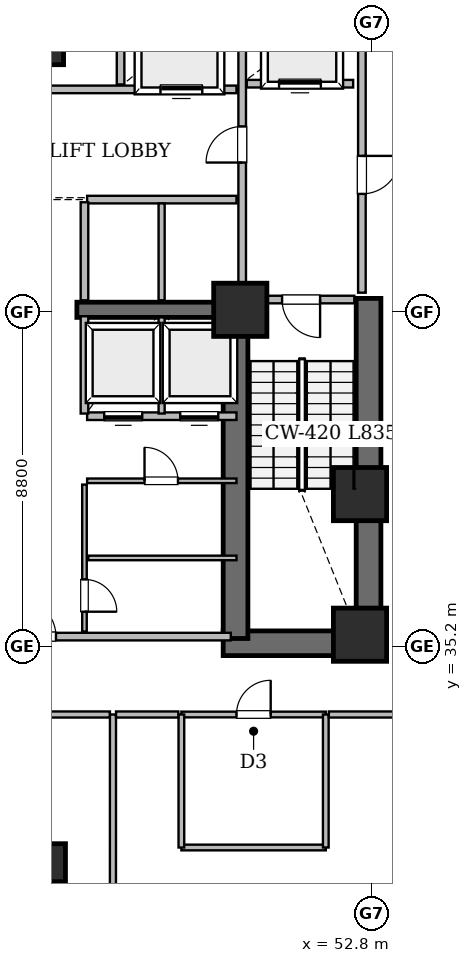
"""IFC4 building model, lengths in metres.
Left out: names, types, materials, properties, quantities, classifications, styles, units other than length and angle.
Written with IfcOpenShell. Run it as: python <this file> out.ifc"""

import sys

from ifc_helpers import new_model, si_unit, direction, frame, frame_2d, origin, origin_2d, place, context, subcontext, project, spatial, rectangle, extrude, element, fill, save


model = new_model("IFC4")
c1 = context("Model", 3, precision=1e-05, world=origin(), true_north=direction((0.0, 1.0)))
c2 = subcontext(c1, "Body", "Model", "MODEL_VIEW")
j1 = project(units=[si_unit("LENGTHUNIT", "METRE"), si_unit("PLANEANGLEUNIT", "RADIAN")], contexts=[c1])
p1 = place(None, origin())
s1 = spatial("IfcSite", under=j1, at=p1, CompositionType="ELEMENT")
p2 = place(p1, origin())
s2 = spatial("IfcBuilding", under=s1, at=p2, CompositionType="ELEMENT")
p3 = place(p2, frame((0.0, 0.0, 14.4)))
s3 = spatial("IfcBuildingStorey", under=s2, at=p3, CompositionType="ELEMENT", Elevation=14.4)
p4 = place(p3, frame((48.9, 35.275, 0.0), z_axis=(0.0, 0.0, 1.0), x_axis=(1.0, 0.0, 0.0)))
e1 = element("IfcWall", 1, at=p4, inside=s3, PredefinedType="SHEAR", context=c2, shape_type="SweptSolid", body=[
    extrude(rectangle(XDim=4.15, YDim=0.65, at=frame_2d((2.075, 0.0))), origin(), (0.0, 0.0, 1.0), 4.5),
])
p5 = place(p3, frame((52.725, 34.95, 0.0), z_axis=(0.0, 0.0, 1.0), x_axis=(0.0, 1.0, 0.0)))
e2 = element("IfcWall", 2, at=p5, inside=s3, PredefinedType="SHEAR", context=c2, shape_type="SweptSolid", body=[
    extrude(rectangle(XDim=9.4, YDim=0.65, at=frame_2d((4.7, 0.0))), origin(), (0.0, 0.0, 1.0), 4.5),
])
p6 = place(p3, frame((49.225, 35.4, 0.0), z_axis=(0.0, 0.0, 1.0), x_axis=(0.0, 1.0, 0.0)))
e3 = element("IfcWall", 3, at=p6, inside=s3, PredefinedType="SHEAR", context=c2, shape_type="SweptSolid", body=[
    extrude(rectangle(XDim=8.95, YDim=0.65, at=frame_2d((4.475, 0.0))), origin(), (0.0, 0.0, 1.0), 4.5),
])
p7 = place(p3, frame((45.05, 44.05, 0.0), z_axis=(0.0, 0.0, 1.0), x_axis=(1.0, 0.0, 0.0)))
e4 = element("IfcWall", 4, at=p7, inside=s3, PredefinedType="SHEAR", context=c2, shape_type="SweptSolid", body=[
    extrude(rectangle(XDim=4.2, YDim=0.4, at=frame_2d((2.1, 0.0))), origin(), (0.0, 0.0, 1.0), 4.5),
])
for number, where, z_axis, x_axis in (
    (5, (52.5, 35.5, 0.0), (0.0, 0.0, 1.0), (1.0, 0.0, 0.0)),
    (6, (52.5, 39.2, 0.0), (0.0, 0.0, 1.0), (1.0, 0.0, 0.0)),
    (7, (49.35, 44.05, 0.0), (0.0, 0.0, 1.0), (1.0, 0.0, 0.0)),
    (8, (44.0, 51.2, 0.0), (0.0, 0.0, 1.0), (1.0, 0.0, 0.0)),
):
    element("IfcColumn", number, at=place(p3, frame(where, z_axis=z_axis, x_axis=x_axis)), inside=s3, PredefinedType="COLUMN", context=c2, shape_type="SweptSolid", body=[
        extrude(rectangle(XDim=1.4, YDim=1.4, at=origin_2d()), origin(), (0.0, 0.0, 1.0), 4.8),
    ])
p8 = place(p3, frame((44.0, 29.5, 0.0), z_axis=(0.0, 0.0, 1.0), x_axis=(1.0, 0.0, 0.0)))
e9 = element("IfcColumn", 9, at=p8, inside=s3, PredefinedType="COLUMN", context=c2, shape_type="SweptSolid", body=[
    extrude(rectangle(XDim=1.5, YDim=1.0, at=origin_2d()), origin(), (0.0, 0.0, 1.0), 4.8),
])
p9 = place(p3, frame((38.9, 35.45, 0.0), z_axis=(0.0, 0.0, 1.0), x_axis=(1.0, 0.0, 0.0)))
e10 = element("IfcWall", 10, at=p9, inside=s3, PredefinedType="SOLIDWALL", context=c2, shape_type="SweptSolid", body=[
    extrude(rectangle(XDim=10.2, YDim=0.2, at=frame_2d((5.1, 0.0))), origin(), (0.0, 0.0, 1.0), 4.5),
])
p10 = place(p9, frame((4.6, 0.0, 0.0)))
e11 = element("IfcOpeningElement", 11, at=p10, cuts=e10, PredefinedType="OPENING", context=c2, shape_type="SweptSolid", body=[
    extrude(rectangle(XDim=1.0, YDim=2.15, at=frame_2d((0.5, 1.075))), frame((0.0, 0.11, 0.0), z_axis=(0.0, -1.0, 0.0), x_axis=(1.0, 0.0, 0.0)), (0.0, 0.0, 1.0), 0.22),
])
p11 = place(p3, frame((52.55, 44.5, 0.0), z_axis=(0.0, 0.0, 1.0), x_axis=(0.0, 1.0, 0.0)))
e12 = element("IfcWall", 12, at=p11, inside=s3, PredefinedType="SOLIDWALL", context=c2, shape_type="SweptSolid", body=[
    extrude(rectangle(XDim=7.92, YDim=0.2, at=frame_2d((3.96, 0.0))), origin(), (0.0, 0.0, 1.0), 4.5),
])
p12 = place(p11, frame((2.6, 0.0, 0.0)))
e13 = element("IfcOpeningElement", 13, at=p12, cuts=e12, PredefinedType="OPENING", context=c2, shape_type="SweptSolid", body=[
    extrude(rectangle(XDim=1.0, YDim=2.15, at=frame_2d((0.5, 1.075))), frame((0.0, 0.11, 0.0), z_axis=(0.0, -1.0, 0.0), x_axis=(1.0, 0.0, 0.0)), (0.0, 0.0, 1.0), 0.22),
])
p13 = place(p3, frame((49.4, 44.5, 0.0), z_axis=(0.0, 0.0, 1.0), x_axis=(0.0, 1.0, 0.0)))
e14 = element("IfcWall", 14, at=p13, inside=s3, PredefinedType="SOLIDWALL", context=c2, shape_type="SweptSolid", body=[
    extrude(rectangle(XDim=7.92, YDim=0.2, at=frame_2d((3.96, 0.0))), origin(), (0.0, 0.0, 1.0), 3.588),
])
p14 = place(p13, frame((3.425, 0.0, 0.0)))
e15 = element("IfcOpeningElement", 15, at=p14, cuts=e14, PredefinedType="OPENING", context=c2, shape_type="SweptSolid", body=[
    extrude(rectangle(XDim=0.95, YDim=2.15, at=frame_2d((0.475, 1.075))), frame((0.0, 0.11, 0.0), z_axis=(0.0, -1.0, 0.0), x_axis=(1.0, 0.0, 0.0)), (0.0, 0.0, 1.0), 0.22),
])
p15 = place(p3, frame((40.08, 33.4, 0.0), z_axis=(0.0, 0.0, 1.0), x_axis=(1.0, 0.0, 0.0)))
e16 = element("IfcWall", 16, at=p15, inside=s3, PredefinedType="SOLIDWALL", context=c2, shape_type="SweptSolid", body=[
    extrude(rectangle(XDim=5.84, YDim=0.16, at=frame_2d((2.92, 0.0))), origin(), (0.0, 0.0, 1.0), 4.5),
])
p16 = place(p15, frame((2.37, 0.0, 0.0)))
e17 = element("IfcOpeningElement", 17, at=p16, cuts=e16, PredefinedType="OPENING", context=c2, shape_type="SweptSolid", body=[
    extrude(rectangle(XDim=1.1, YDim=2.15, at=frame_2d((0.55, 1.075))), frame((0.0, 0.09, 0.0), z_axis=(0.0, -1.0, 0.0), x_axis=(1.0, 0.0, 0.0)), (0.0, 0.0, 1.0), 0.18),
])
p17 = place(p3, frame((43.75, 49.85, 0.0), z_axis=(0.0, 0.0, 1.0), x_axis=(1.0, 0.0, 0.0)))
e18 = element("IfcWall", 18, at=p17, inside=s3, PredefinedType="SOLIDWALL", context=c2, shape_type="SweptSolid", body=[
    extrude(rectangle(XDim=5.5, YDim=0.2, at=frame_2d((2.75, 0.0))), origin(), (0.0, 0.0, 1.0), 3.588),
])
p18 = place(p17, frame((3.5, 0.0, 0.0)))
e19 = element("IfcOpeningElement", 19, at=p18, cuts=e18, PredefinedType="OPENING", context=c2, shape_type="SweptSolid", body=[
    extrude(rectangle(XDim=1.1, YDim=2.15, at=frame_2d((0.55, 1.075))), frame((0.0, 0.11, 0.0), z_axis=(0.0, -1.0, 0.0), x_axis=(1.0, 0.0, 0.0)), (0.0, 0.0, 1.0), 0.22),
])
p19 = place(p3, frame((45.32, 41.25, 0.0), z_axis=(0.0, 0.0, 1.0), x_axis=(1.0, 0.0, 0.0)))
e20 = element("IfcWall", 20, at=p19, inside=s3, PredefinedType="SOLIDWALL", context=c2, shape_type="SweptSolid", body=[
    extrude(rectangle(XDim=3.93, YDim=0.2, at=frame_2d((1.965, 0.0))), origin(), (0.0, 0.0, 1.0), 4.5),
])
p20 = place(p19, frame((0.45, 0.0, 0.0)))
e21 = element("IfcOpeningElement", 21, at=p20, cuts=e20, PredefinedType="OPENING", context=c2, shape_type="SweptSolid", body=[
    extrude(rectangle(XDim=1.0, YDim=2.15, at=frame_2d((0.5, 1.075))), frame((0.0, 0.11, 0.0), z_axis=(0.0, -1.0, 0.0), x_axis=(1.0, 0.0, 0.0)), (0.0, 0.0, 1.0), 0.22),
])
p21 = place(p19, frame((2.45, 0.0, 0.0)))
e22 = element("IfcOpeningElement", 22, at=p21, cuts=e20, PredefinedType="OPENING", context=c2, shape_type="SweptSolid", body=[
    extrude(rectangle(XDim=1.0, YDim=2.15, at=frame_2d((0.5, 1.075))), frame((0.0, 0.11, 0.0), z_axis=(0.0, -1.0, 0.0), x_axis=(1.0, 0.0, 0.0)), (0.0, 0.0, 1.0), 0.22),
])
p22 = place(p3, frame((45.32, 39.55, 0.0), z_axis=(0.0, 0.0, 1.0), x_axis=(1.0, 0.0, 0.0)))
e23 = element("IfcWall", 23, at=p22, inside=s3, PredefinedType="PARTITIONING", context=c2, shape_type="SweptSolid", body=[
    extrude(rectangle(XDim=3.93, YDim=0.12, at=frame_2d((1.965, 0.0))), origin(), (0.0, 0.0, 1.0), 4.5),
])
p23 = place(p22, frame((1.51, 0.0, 0.0)))
e24 = element("IfcOpeningElement", 24, at=p23, cuts=e23, PredefinedType="OPENING", context=c2, shape_type="SweptSolid", body=[
    extrude(rectangle(XDim=0.88, YDim=2.1, at=frame_2d((0.44, 1.05))), frame((0.0, 0.07, 0.0), z_axis=(0.0, -1.0, 0.0), x_axis=(1.0, 0.0, 0.0)), (0.0, 0.0, 1.0), 0.14),
])
p24 = place(p3, frame((45.25, 35.58, 0.0), z_axis=(0.0, 0.0, 1.0), x_axis=(0.0, 1.0, 0.0)))
e25 = element("IfcWall", 25, at=p24, inside=s3, PredefinedType="PARTITIONING", context=c2, shape_type="SweptSolid", body=[
    extrude(rectangle(XDim=3.87, YDim=0.12, at=frame_2d((1.935, 0.0))), origin(), (0.0, 0.0, 1.0), 4.5),
])
p25 = place(p24, frame((0.525, 0.0, 0.0)))
e26 = element("IfcOpeningElement", 26, at=p25, cuts=e25, PredefinedType="OPENING", context=c2, shape_type="SweptSolid", body=[
    extrude(rectangle(XDim=0.85, YDim=2.1, at=frame_2d((0.425, 1.05))), frame((0.0, 0.07, 0.0), z_axis=(0.0, -1.0, 0.0), x_axis=(1.0, 0.0, 0.0)), (0.0, 0.0, 1.0), 0.14),
])
p26 = place(p3, frame((47.8, 33.4, 0.0), z_axis=(0.0, 0.0, 1.0), x_axis=(1.0, 0.0, 0.0)))
e27 = element("IfcWall", 27, at=p26, inside=s3, PredefinedType="PLUMBINGWALL", context=c2, shape_type="SweptSolid", body=[
    extrude(rectangle(XDim=3.8, YDim=0.15, at=frame_2d((1.9, 0.0))), origin(), (0.0, 0.0, 1.0), 3.688),
])
p27 = place(p26, frame((1.45, 0.0, 0.0)))
e28 = element("IfcOpeningElement", 28, at=p27, cuts=e27, PredefinedType="OPENING", context=c2, shape_type="SweptSolid", body=[
    extrude(rectangle(XDim=0.9, YDim=2.1, at=frame_2d((0.45, 1.05))), frame((0.0, 0.085, 0.0), z_axis=(0.0, -1.0, 0.0), x_axis=(1.0, 0.0, 0.0)), (0.0, 0.0, 1.0), 0.17),
])
p28 = place(p3, frame((49.55, 44.32, 0.0), z_axis=(0.0, 0.0, 1.0), x_axis=(1.0, 0.0, 0.0)))
e29 = element("IfcWall", 29, at=p28, inside=s3, PredefinedType="SOLIDWALL", context=c2, shape_type="SweptSolid", body=[
    extrude(rectangle(XDim=2.8, YDim=0.2, at=frame_2d((1.4, 0.0))), origin(), (0.0, 0.0, 1.0), 3.588),
])
p29 = place(p28, frame((0.9, 0.0, 0.0)))
e30 = element("IfcOpeningElement", 30, at=p29, cuts=e29, PredefinedType="OPENING", context=c2, shape_type="SweptSolid", body=[
    extrude(rectangle(XDim=1.0, YDim=2.15, at=frame_2d((0.5, 1.075))), frame((0.0, 0.11, 0.0), z_axis=(0.0, -1.0, 0.0), x_axis=(1.0, 0.0, 0.0)), (0.0, 0.0, 1.0), 0.22),
])
p30 = place(p3, frame((49.52, 50.0, 0.0), z_axis=(0.0, 0.0, 1.0), x_axis=(1.0, 0.0, 0.0)))
e31 = element("IfcWall", 31, at=p30, inside=s3, PredefinedType="SOLIDWALL", context=c2, shape_type="SweptSolid", body=[
    extrude(rectangle(XDim=2.8, YDim=0.2, at=frame_2d((1.4, 0.0))), origin(), (0.0, 0.0, 1.0), 4.5),
])
p31 = place(p30, frame((0.85, 0.0, 0.0)))
e32 = element("IfcOpeningElement", 32, at=p31, cuts=e31, PredefinedType="OPENING", context=c2, shape_type="SweptSolid", body=[
    extrude(rectangle(XDim=1.1, YDim=2.15, at=frame_2d((0.55, 1.075))), frame((0.0, 0.11, 0.0), z_axis=(0.0, -1.0, 0.0), x_axis=(1.0, 0.0, 0.0)), (0.0, 0.0, 1.0), 0.22),
])
p32 = place(p3, frame((45.996, 16.413, 0.0), z_axis=(0.0, 0.0, 1.0), x_axis=(0.000229957739, 0.99999997356, 0.0)))
e33 = element("IfcWall", 33, at=p32, inside=s3, PredefinedType="SOLIDWALL", context=c2, shape_type="SweptSolid", body=[
    extrude(rectangle(XDim=16.987, YDim=0.16, at=frame_2d((8.493, 0.0))), origin(), (0.0, 0.0, 1.0), 3.688),
])
p33 = place(p3, frame((45.32, 46.95, 0.0), z_axis=(0.0, 0.0, 1.0), x_axis=(1.0, 0.0, 0.0)))
e34 = element("IfcWall", 34, at=p33, inside=s3, PredefinedType="SOLIDWALL", context=c2, shape_type="SweptSolid", body=[
    extrude(rectangle(XDim=3.93, YDim=0.2, at=frame_2d((1.965, 0.0))), origin(), (0.0, 0.0, 1.0), 3.588),
])
p34 = place(p3, frame((45.35, 37.52, 0.0), z_axis=(0.0, 0.0, 1.0), x_axis=(1.0, 0.0, 0.0)))
e35 = element("IfcWall", 35, at=p34, inside=s3, PredefinedType="PARTITIONING", context=c2, shape_type="SweptSolid", body=[
    extrude(rectangle(XDim=3.9, YDim=0.12, at=frame_2d((1.95, 0.0))), origin(), (0.0, 0.0, 1.0), 4.5),
])
p35 = place(p3, frame((47.8, 29.9, 0.0), z_axis=(0.0, 0.0, 1.0), x_axis=(1.0, 0.0, 0.0)))
e36 = element("IfcWall", 36, at=p35, inside=s3, PredefinedType="PLUMBINGWALL", context=c2, shape_type="SweptSolid", body=[
    extrude(rectangle(XDim=3.8, YDim=0.15, at=frame_2d((1.9, 0.0))), origin(), (0.0, 0.0, 1.0), 4.5),
])
for number, where, z_axis, x_axis in (
    (37, (47.8, 33.4, 0.0), (0.0, 0.0, 1.0), (0.0, -1.0, 0.0)),
    (38, (51.6, 29.9, 0.0), (0.0, 0.0, 1.0), (0.0, 1.0, 0.0)),
):
    element("IfcWall", number, at=place(p3, frame(where, z_axis=z_axis, x_axis=x_axis)), inside=s3, PredefinedType="PLUMBINGWALL", context=c2, shape_type="SweptSolid", body=[
        extrude(rectangle(XDim=3.5, YDim=0.15, at=frame_2d((1.75, 0.0))), origin(), (0.0, 0.0, 1.0), 3.688),
    ])
p36 = place(p3, frame((51.68, 33.4, 0.0), z_axis=(0.0, 0.0, 1.0), x_axis=(1.0, 0.0, 0.0)))
e39 = element("IfcWall", 39, at=p36, inside=s3, PredefinedType="SOLIDWALL", context=c2, shape_type="SweptSolid", body=[
    extrude(rectangle(XDim=2.84, YDim=0.16, at=frame_2d((1.42, 0.0))), origin(), (0.0, 0.0, 1.0), 3.688),
])
p37 = place(p3, frame((45.25, 44.3, 0.0), z_axis=(0.0, 0.0, 1.0), x_axis=(0.0, 1.0, 0.0)))
e40 = element("IfcWall", 40, at=p37, inside=s3, PredefinedType="SOLIDWALL", context=c2, shape_type="SweptSolid", body=[
    extrude(rectangle(XDim=2.58, YDim=0.2, at=frame_2d((1.29, 0.0))), origin(), (0.0, 0.0, 1.0), 4.5),
])
p38 = place(p3, frame((45.25, 41.32, 0.0), z_axis=(0.0, 0.0, 1.0), x_axis=(0.0, 1.0, 0.0)))
e41 = element("IfcWall", 41, at=p38, inside=s3, PredefinedType="SOLIDWALL", context=c2, shape_type="SweptSolid", body=[
    extrude(rectangle(XDim=2.56, YDim=0.2, at=frame_2d((1.28, 0.0))), origin(), (0.0, 0.0, 1.0), 4.5),
])
p39 = place(p3, frame((47.28, 44.3, 0.0), z_axis=(0.0, 0.0, 1.0), x_axis=(0.0, 1.0, 0.0)))
e42 = element("IfcWall", 42, at=p39, inside=s3, PredefinedType="SOLIDWALL", context=c2, shape_type="SweptSolid", body=[
    extrude(rectangle(XDim=2.55, YDim=0.16, at=frame_2d((1.275, 0.0))), origin(), (0.0, 0.0, 1.0), 3.588),
])
p40 = place(p3, frame((47.28, 41.32, 0.0), z_axis=(0.0, 0.0, 1.0), x_axis=(0.0, 1.0, 0.0)))
e43 = element("IfcWall", 43, at=p40, inside=s3, PredefinedType="SOLIDWALL", context=c2, shape_type="SweptSolid", body=[
    extrude(rectangle(XDim=2.53, YDim=0.16, at=frame_2d((1.265, 0.0))), origin(), (0.0, 0.0, 1.0), 4.5),
])
p41 = place(p3, frame((46.2, 49.98, 0.0), z_axis=(0.0, 0.0, 1.0), x_axis=(0.0, 1.0, 0.0)))
e44 = element("IfcWall", 44, at=p41, inside=s3, PredefinedType="SOLIDWALL", context=c2, shape_type="SweptSolid", body=[
    extrude(rectangle(XDim=2.37, YDim=0.2, at=frame_2d((1.185, 0.0))), origin(), (0.0, 0.0, 1.0), 4.5),
])
p42 = place(p3, frame((46.08, 33.4, 0.0), z_axis=(0.0, 0.0, 1.0), x_axis=(1.0, 0.0, 0.0)))
e45 = element("IfcWall", 45, at=p42, inside=s3, PredefinedType="SOLIDWALL", context=c2, shape_type="SweptSolid", body=[
    extrude(rectangle(XDim=1.64, YDim=0.16, at=frame_2d((0.82, 0.0))), origin(), (0.0, 0.0, 1.0), 4.5),
])
p43 = place(p29, frame((1.0, 0.0, 0.0), z_axis=(0.0, 0.0, 1.0), x_axis=(-1.0, 0.0, 0.0)))
e46 = element("IfcDoor", 46, at=p43, inside=s3, OperationType="SINGLE_SWING_RIGHT", PredefinedType="DOOR", context=c2, shape_type="SweptSolid", body=[
    extrude(rectangle(XDim=1.0, YDim=2.15, at=frame_2d((0.5, 1.075))), frame((0.0, 0.025, 0.0), z_axis=(0.0, -1.0, 0.0), x_axis=(1.0, 0.0, 0.0)), (0.0, 0.0, 1.0), 0.05),
])
fill(e30, e46)
p44 = place(p12, frame((1.0, 0.0, 0.0), z_axis=(0.0, 0.0, 1.0), x_axis=(-1.0, 0.0, 0.0)))
e47 = element("IfcDoor", 47, at=p44, inside=s3, OperationType="SINGLE_SWING_RIGHT", PredefinedType="DOOR", context=c2, shape_type="SweptSolid", body=[
    extrude(rectangle(XDim=1.0, YDim=2.15, at=frame_2d((0.5, 1.075))), frame((0.0, 0.025, 0.0), z_axis=(0.0, -1.0, 0.0), x_axis=(1.0, 0.0, 0.0)), (0.0, 0.0, 1.0), 0.05),
])
fill(e13, e47)
p45 = place(p14, origin())
e48 = element("IfcDoor", 48, at=p45, inside=s3, OperationType="SINGLE_SWING_LEFT", PredefinedType="DOOR", context=c2, shape_type="SweptSolid", body=[
    extrude(rectangle(XDim=0.95, YDim=2.15, at=frame_2d((0.475, 1.075))), frame((0.0, 0.025, 0.0), z_axis=(0.0, -1.0, 0.0), x_axis=(1.0, 0.0, 0.0)), (0.0, 0.0, 1.0), 0.05),
])
fill(e15, e48)
p46 = place(p31, origin())
e49 = element("IfcDoor", 49, at=p46, inside=s3, OperationType="SLIDING_TO_LEFT", PredefinedType="DOOR", context=c2, shape_type="SweptSolid", body=[
    extrude(rectangle(XDim=1.1, YDim=2.15, at=frame_2d((0.55, 1.075))), frame((0.0, 0.025, 0.0), z_axis=(0.0, -1.0, 0.0), x_axis=(1.0, 0.0, 0.0)), (0.0, 0.0, 1.0), 0.05),
])
fill(e32, e49)
p47 = place(p10, origin())
e50 = element("IfcDoor", 50, at=p47, inside=s3, OperationType="SINGLE_SWING_LEFT", PredefinedType="DOOR", context=c2, shape_type="SweptSolid", body=[
    extrude(rectangle(XDim=1.0, YDim=2.15, at=frame_2d((0.5, 1.075))), frame((0.0, 0.025, 0.0), z_axis=(0.0, -1.0, 0.0), x_axis=(1.0, 0.0, 0.0)), (0.0, 0.0, 1.0), 0.05),
])
fill(e11, e50)
p48 = place(p18, origin())
e51 = element("IfcDoor", 51, at=p48, inside=s3, OperationType="SLIDING_TO_LEFT", PredefinedType="DOOR", context=c2, shape_type="SweptSolid", body=[
    extrude(rectangle(XDim=1.1, YDim=2.15, at=frame_2d((0.55, 1.075))), frame((0.0, 0.025, 0.0), z_axis=(0.0, -1.0, 0.0), x_axis=(1.0, 0.0, 0.0)), (0.0, 0.0, 1.0), 0.05),
])
fill(e19, e51)
p49 = place(p20, frame((1.0, 0.0, 0.0), z_axis=(0.0, 0.0, 1.0), x_axis=(-1.0, 0.0, 0.0)))
e52 = element("IfcDoor", 52, at=p49, inside=s3, OperationType="SLIDING_TO_LEFT", PredefinedType="DOOR", context=c2, shape_type="SweptSolid", body=[
    extrude(rectangle(XDim=1.0, YDim=2.15, at=frame_2d((0.5, 1.075))), frame((0.0, 0.025, 0.0), z_axis=(0.0, -1.0, 0.0), x_axis=(1.0, 0.0, 0.0)), (0.0, 0.0, 1.0), 0.05),
])
fill(e21, e52)
p50 = place(p21, frame((1.0, 0.0, 0.0), z_axis=(0.0, 0.0, 1.0), x_axis=(-1.0, 0.0, 0.0)))
e53 = element("IfcDoor", 53, at=p50, inside=s3, OperationType="SLIDING_TO_LEFT", PredefinedType="DOOR", context=c2, shape_type="SweptSolid", body=[
    extrude(rectangle(XDim=1.0, YDim=2.15, at=frame_2d((0.5, 1.075))), frame((0.0, 0.025, 0.0), z_axis=(0.0, -1.0, 0.0), x_axis=(1.0, 0.0, 0.0)), (0.0, 0.0, 1.0), 0.05),
])
fill(e22, e53)
p51 = place(p25, frame((0.85, 0.0, 0.0), z_axis=(0.0, 0.0, 1.0), x_axis=(-1.0, 0.0, 0.0)))
e54 = element("IfcDoor", 54, at=p51, inside=s3, OperationType="SINGLE_SWING_LEFT", PredefinedType="DOOR", context=c2, shape_type="SweptSolid", body=[
    extrude(rectangle(XDim=0.85, YDim=2.1, at=frame_2d((0.425, 1.05))), frame((0.0, 0.025, 0.0), z_axis=(0.0, -1.0, 0.0), x_axis=(1.0, 0.0, 0.0)), (0.0, 0.0, 1.0), 0.05),
])
fill(e26, e54)
p52 = place(p23, origin())
e55 = element("IfcDoor", 55, at=p52, inside=s3, OperationType="SINGLE_SWING_LEFT", PredefinedType="DOOR", context=c2, shape_type="SweptSolid", body=[
    extrude(rectangle(XDim=0.88, YDim=2.1, at=frame_2d((0.44, 1.05))), frame((0.0, 0.025, 0.0), z_axis=(0.0, -1.0, 0.0), x_axis=(1.0, 0.0, 0.0)), (0.0, 0.0, 1.0), 0.05),
])
fill(e24, e55)
p53 = place(p27, origin())
e56 = element("IfcDoor", 56, at=p53, inside=s3, OperationType="SINGLE_SWING_RIGHT", PredefinedType="DOOR", context=c2, shape_type="SweptSolid", body=[
    extrude(rectangle(XDim=0.9, YDim=2.1, at=frame_2d((0.45, 1.05))), frame((0.0, 0.025, 0.0), z_axis=(0.0, -1.0, 0.0), x_axis=(1.0, 0.0, 0.0)), (0.0, 0.0, 1.0), 0.05),
])
fill(e28, e56)
save(model, sys.argv[1])
